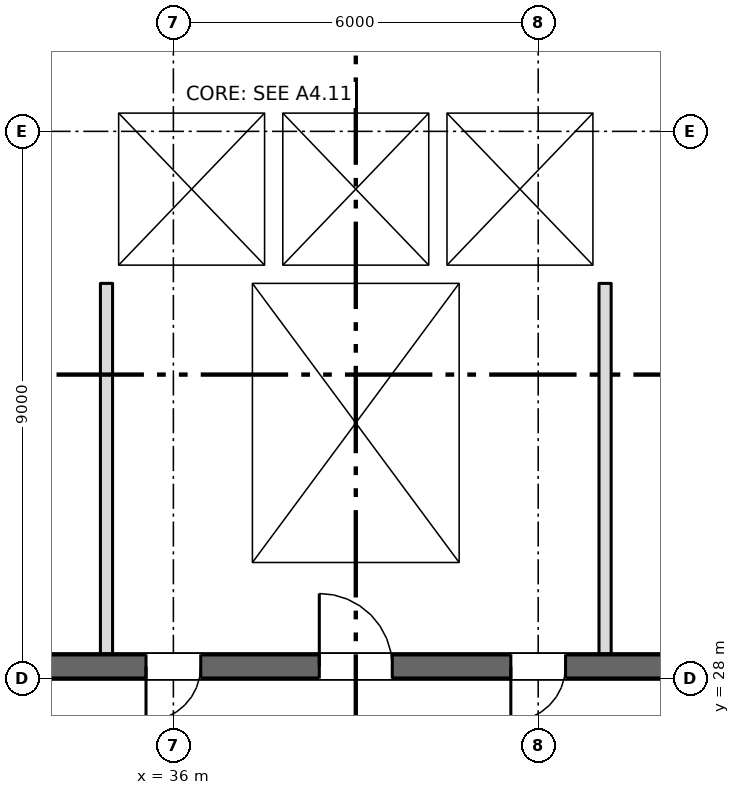
"""IFC4 building model, lengths in metres.
Left out: names, types, materials, properties, quantities, classifications, styles, units other than length and angle.
Written with IfcOpenShell. Run it as: python <this file> out.ifc"""

import sys

from ifc_helpers import new_model, si_unit, direction, frame, frame_2d, origin, place, context, subcontext, project, spatial, rectangle, extrude, element, fill, save


model = new_model("IFC4")
c1 = context("Model", 3, precision=1e-05, world=origin(), true_north=direction((0.0, 1.0)))
c2 = subcontext(c1, "Body", "Model", "MODEL_VIEW")
j1 = project(units=[si_unit("LENGTHUNIT", "METRE"), si_unit("PLANEANGLEUNIT", "RADIAN")], contexts=[c1])
p1 = place(None, origin())
s1 = spatial("IfcSite", under=j1, at=p1, CompositionType="ELEMENT")
p2 = place(p1, origin())
s2 = spatial("IfcBuilding", under=s1, at=p2, CompositionType="ELEMENT")
p3 = place(p2, frame((0.0, 0.0, 63.75)))
s3 = spatial("IfcBuildingStorey", under=s2, at=p3, CompositionType="ELEMENT", Elevation=63.75)
p4 = place(p3, frame((6.7, 28.2, 0.0), z_axis=(0.0, 0.0, 1.0), x_axis=(1.0, 0.0, 0.0)))
e1 = element("IfcWall", 1, at=p4, inside=s3, PredefinedType="SHEAR", context=c2, shape_type="SweptSolid", body=[
    extrude(rectangle(XDim=57.8, YDim=0.4, at=frame_2d((28.9, 0.0))), origin(), (0.0, 0.0, 1.0), 3.35),
])
p5 = place(p4, frame((12.562, 0.0, 0.0)))
e2 = element("IfcOpeningElement", 2, at=p5, cuts=e1, PredefinedType="OPENING", context=c2, shape_type="SweptSolid", body=[
    extrude(rectangle(XDim=0.9, YDim=2.1, at=frame_2d((0.45, 1.05))), frame((0.0, 0.21, 0.0), z_axis=(0.0, -1.0, 0.0), x_axis=(1.0, 0.0, 0.0)), (0.0, 0.0, 1.0), 0.42),
])
p6 = place(p4, frame((15.137, 0.0, 0.0)))
e3 = element("IfcOpeningElement", 3, at=p6, cuts=e1, PredefinedType="OPENING", context=c2, shape_type="SweptSolid", body=[
    extrude(rectangle(XDim=0.9, YDim=2.1, at=frame_2d((0.45, 1.05))), frame((0.0, 0.21, 0.0), z_axis=(0.0, -1.0, 0.0), x_axis=(1.0, 0.0, 0.0)), (0.0, 0.0, 1.0), 0.42),
])
p7 = place(p4, frame((49.85, 0.0, 0.0)))
e4 = element("IfcOpeningElement", 4, at=p7, cuts=e1, PredefinedType="OPENING", context=c2, shape_type="SweptSolid", body=[
    extrude(rectangle(XDim=0.9, YDim=2.1, at=frame_2d((0.45, 1.05))), frame((0.0, 0.21, 0.0), z_axis=(0.0, -1.0, 0.0), x_axis=(1.0, 0.0, 0.0)), (0.0, 0.0, 1.0), 0.42),
])
p8 = place(p4, frame((0.562, 0.0, 0.0)))
e5 = element("IfcOpeningElement", 5, at=p8, cuts=e1, PredefinedType="OPENING", context=c2, shape_type="SweptSolid", body=[
    extrude(rectangle(XDim=0.9, YDim=2.1, at=frame_2d((0.45, 1.05))), frame((0.0, 0.21, 0.0), z_axis=(0.0, -1.0, 0.0), x_axis=(1.0, 0.0, 0.0)), (0.0, 0.0, 1.0), 0.42),
])
p9 = place(p4, frame((2.137, 0.0, 0.0)))
e6 = element("IfcOpeningElement", 6, at=p9, cuts=e1, PredefinedType="OPENING", context=c2, shape_type="SweptSolid", body=[
    extrude(rectangle(XDim=0.9, YDim=2.1, at=frame_2d((0.45, 1.05))), frame((0.0, 0.21, 0.0), z_axis=(0.0, -1.0, 0.0), x_axis=(1.0, 0.0, 0.0)), (0.0, 0.0, 1.0), 0.42),
])
p10 = place(p4, frame((4.7, 0.0, 0.0)))
e7 = element("IfcOpeningElement", 7, at=p10, cuts=e1, PredefinedType="OPENING", context=c2, shape_type="SweptSolid", body=[
    extrude(rectangle(XDim=1.2, YDim=2.1, at=frame_2d((0.6, 1.05))), frame((0.0, 0.21, 0.0), z_axis=(0.0, -1.0, 0.0), x_axis=(1.0, 0.0, 0.0)), (0.0, 0.0, 1.0), 0.42),
])
p11 = place(p4, frame((31.7, 0.0, 0.0)))
e8 = element("IfcOpeningElement", 8, at=p11, cuts=e1, PredefinedType="OPENING", context=c2, shape_type="SweptSolid", body=[
    extrude(rectangle(XDim=1.2, YDim=2.1, at=frame_2d((0.6, 1.05))), frame((0.0, 0.21, 0.0), z_axis=(0.0, -1.0, 0.0), x_axis=(1.0, 0.0, 0.0)), (0.0, 0.0, 1.0), 0.42),
])
p12 = place(p4, frame((55.2, 0.0, 0.0)))
e9 = element("IfcOpeningElement", 9, at=p12, cuts=e1, PredefinedType="OPENING", context=c2, shape_type="SweptSolid", body=[
    extrude(rectangle(XDim=1.2, YDim=2.1, at=frame_2d((0.6, 1.05))), frame((0.0, 0.21, 0.0), z_axis=(0.0, -1.0, 0.0), x_axis=(1.0, 0.0, 0.0)), (0.0, 0.0, 1.0), 0.42),
])
p13 = place(p4, frame((21.7, 0.0, 0.0)))
e10 = element("IfcOpeningElement", 10, at=p13, cuts=e1, PredefinedType="OPENING", context=c2, shape_type="SweptSolid", body=[
    extrude(rectangle(XDim=1.2, YDim=2.1, at=frame_2d((0.6, 1.05))), frame((0.0, 0.21, 0.0), z_axis=(0.0, -1.0, 0.0), x_axis=(1.0, 0.0, 0.0)), (0.0, 0.0, 1.0), 0.42),
])
p14 = place(p4, frame((41.7, 0.0, 0.0)))
e11 = element("IfcOpeningElement", 11, at=p14, cuts=e1, PredefinedType="OPENING", context=c2, shape_type="SweptSolid", body=[
    extrude(rectangle(XDim=1.2, YDim=2.1, at=frame_2d((0.6, 1.05))), frame((0.0, 0.21, 0.0), z_axis=(0.0, -1.0, 0.0), x_axis=(1.0, 0.0, 0.0)), (0.0, 0.0, 1.0), 0.42),
])
p15 = place(p4, frame((24.85, 0.0, 0.0)))
e12 = element("IfcOpeningElement", 12, at=p15, cuts=e1, PredefinedType="OPENING", context=c2, shape_type="SweptSolid", body=[
    extrude(rectangle(XDim=2.4, YDim=2.1, at=frame_2d((1.2, 1.05))), frame((0.0, 0.21, 0.0), z_axis=(0.0, -1.0, 0.0), x_axis=(1.0, 0.0, 0.0)), (0.0, 0.0, 1.0), 0.42),
])
p16 = place(p4, frame((37.35, 0.0, 0.0)))
e13 = element("IfcOpeningElement", 13, at=p16, cuts=e1, PredefinedType="OPENING", context=c2, shape_type="SweptSolid", body=[
    extrude(rectangle(XDim=2.4, YDim=2.1, at=frame_2d((1.2, 1.05))), frame((0.0, 0.21, 0.0), z_axis=(0.0, -1.0, 0.0), x_axis=(1.0, 0.0, 0.0)), (0.0, 0.0, 1.0), 0.42),
])
p17 = place(p4, frame((7.85, 0.0, 0.0)))
e14 = element("IfcOpeningElement", 14, at=p17, cuts=e1, PredefinedType="OPENING", context=c2, shape_type="SweptSolid", body=[
    extrude(rectangle(XDim=2.4, YDim=2.1, at=frame_2d((1.2, 1.05))), frame((0.0, 0.21, 0.0), z_axis=(0.0, -1.0, 0.0), x_axis=(1.0, 0.0, 0.0)), (0.0, 0.0, 1.0), 0.42),
])
p18 = place(p4, frame((28.85, 0.0, 0.0)))
e15 = element("IfcOpeningElement", 15, at=p18, cuts=e1, PredefinedType="OPENING", context=c2, shape_type="SweptSolid", body=[
    extrude(rectangle(XDim=0.9, YDim=2.1, at=frame_2d((0.45, 1.05))), frame((0.0, 0.21, 0.0), z_axis=(0.0, -1.0, 0.0), x_axis=(1.0, 0.0, 0.0)), (0.0, 0.0, 1.0), 0.42),
])
p19 = place(p4, frame((34.85, 0.0, 0.0)))
e16 = element("IfcOpeningElement", 16, at=p19, cuts=e1, PredefinedType="OPENING", context=c2, shape_type="SweptSolid", body=[
    extrude(rectangle(XDim=0.9, YDim=2.1, at=frame_2d((0.45, 1.05))), frame((0.0, 0.21, 0.0), z_axis=(0.0, -1.0, 0.0), x_axis=(1.0, 0.0, 0.0)), (0.0, 0.0, 1.0), 0.42),
])
for number, where, z_axis, x_axis in (
    (17, (37.15, 28.4, 0.0), (0.0, 0.0, 1.0), (0.0, 1.0, 0.0)),
    (18, (40.85, 28.4, 0.0), (0.0, 0.0, 1.0), (0.0, 1.0, 0.0)),
):
    element("IfcWall", number, at=place(p3, frame(where, z_axis=z_axis, x_axis=x_axis)), inside=s3, PredefinedType="SHEAR", context=c2, shape_type="SweptSolid", body=[
        extrude(rectangle(XDim=6.1, YDim=0.3, at=frame_2d((3.05, 0.0))), origin(), (0.0, 0.0, 1.0), 3.35),
    ])
p20 = place(p3, frame((34.8, 34.65, 0.0), z_axis=(0.0, 0.0, 1.0), x_axis=(1.0, 0.0, 0.0)))
e19 = element("IfcWall", 19, at=p20, inside=s3, PredefinedType="SHEAR", context=c2, shape_type="SweptSolid", body=[
    extrude(rectangle(XDim=8.4, YDim=0.3, at=frame_2d((4.2, 0.0))), origin(), (0.0, 0.0, 1.0), 3.35),
])
p21 = place(p3, frame((34.8, 37.45, 0.0), z_axis=(0.0, 0.0, 1.0), x_axis=(1.0, 0.0, 0.0)))
e20 = element("IfcWall", 20, at=p21, inside=s3, PredefinedType="SHEAR", context=c2, shape_type="SweptSolid", body=[
    extrude(rectangle(XDim=8.4, YDim=0.3, at=frame_2d((4.2, 0.0))), origin(), (0.0, 0.0, 1.0), 3.35),
])
p22 = place(p21, frame((0.95, 0.0, 0.0)))
e21 = element("IfcOpeningElement", 21, at=p22, cuts=e20, PredefinedType="OPENING", context=c2, shape_type="SweptSolid", body=[
    extrude(rectangle(XDim=1.1, YDim=2.1, at=frame_2d((0.55, 1.05))), frame((0.0, 0.16, 0.0), z_axis=(0.0, -1.0, 0.0), x_axis=(1.0, 0.0, 0.0)), (0.0, 0.0, 1.0), 0.32),
])
p23 = place(p21, frame((3.65, 0.0, 0.0)))
e22 = element("IfcOpeningElement", 22, at=p23, cuts=e20, PredefinedType="OPENING", context=c2, shape_type="SweptSolid", body=[
    extrude(rectangle(XDim=1.1, YDim=2.1, at=frame_2d((0.55, 1.05))), frame((0.0, 0.16, 0.0), z_axis=(0.0, -1.0, 0.0), x_axis=(1.0, 0.0, 0.0)), (0.0, 0.0, 1.0), 0.32),
])
p24 = place(p21, frame((6.35, 0.0, 0.0)))
e23 = element("IfcOpeningElement", 23, at=p24, cuts=e20, PredefinedType="OPENING", context=c2, shape_type="SweptSolid", body=[
    extrude(rectangle(XDim=1.1, YDim=2.1, at=frame_2d((0.55, 1.05))), frame((0.0, 0.16, 0.0), z_axis=(0.0, -1.0, 0.0), x_axis=(1.0, 0.0, 0.0)), (0.0, 0.0, 1.0), 0.32),
])
for number, where, z_axis, x_axis in (
    (24, (34.95, 34.8, 0.0), (0.0, 0.0, 1.0), (0.0, 1.0, 0.0)),
    (25, (43.05, 34.8, 0.0), (0.0, 0.0, 1.0), (0.0, 1.0, 0.0)),
    (26, (37.65, 34.8, 0.0), (0.0, 0.0, 1.0), (0.0, 1.0, 0.0)),
    (27, (40.35, 34.8, 0.0), (0.0, 0.0, 1.0), (0.0, 1.0, 0.0)),
):
    element("IfcWall", number, at=place(p3, frame(where, z_axis=z_axis, x_axis=x_axis)), inside=s3, PredefinedType="SHEAR", context=c2, shape_type="SweptSolid", body=[
        extrude(rectangle(XDim=2.5, YDim=0.3, at=frame_2d((1.25, 0.0))), origin(), (0.0, 0.0, 1.0), 3.35),
    ])
for number, where, z_axis, x_axis in (
    (28, (34.9, 28.4, 0.0), (0.0, 0.0, 1.0), (0.0, 1.0, 0.0)),
    (29, (43.1, 28.4, 0.0), (0.0, 0.0, 1.0), (0.0, 1.0, 0.0)),
):
    element("IfcWall", number, at=place(p3, frame(where, z_axis=z_axis, x_axis=x_axis)), inside=s3, PredefinedType="PARTITIONING", context=c2, shape_type="SweptSolid", body=[
        extrude(rectangle(XDim=6.1, YDim=0.2, at=frame_2d((3.05, 0.0))), origin(), (0.0, 0.0, 1.0), 3.35),
    ])
p25 = place(p22, origin())
e30 = element("IfcDoor", 30, at=p25, inside=s3, OperationType="SLIDING_TO_LEFT", PredefinedType="DOOR", context=c2, shape_type="SweptSolid", body=[
    extrude(rectangle(XDim=1.1, YDim=2.1, at=frame_2d((0.55, 1.05))), frame((0.0, 0.025, 0.0), z_axis=(0.0, -1.0, 0.0), x_axis=(1.0, 0.0, 0.0)), (0.0, 0.0, 1.0), 0.05),
])
fill(e21, e30)
p26 = place(p23, origin())
e31 = element("IfcDoor", 31, at=p26, inside=s3, OperationType="SLIDING_TO_LEFT", PredefinedType="DOOR", context=c2, shape_type="SweptSolid", body=[
    extrude(rectangle(XDim=1.1, YDim=2.1, at=frame_2d((0.55, 1.05))), frame((0.0, 0.025, 0.0), z_axis=(0.0, -1.0, 0.0), x_axis=(1.0, 0.0, 0.0)), (0.0, 0.0, 1.0), 0.05),
])
fill(e22, e31)
p27 = place(p24, origin())
e32 = element("IfcDoor", 32, at=p27, inside=s3, OperationType="SLIDING_TO_LEFT", PredefinedType="DOOR", context=c2, shape_type="SweptSolid", body=[
    extrude(rectangle(XDim=1.1, YDim=2.1, at=frame_2d((0.55, 1.05))), frame((0.0, 0.025, 0.0), z_axis=(0.0, -1.0, 0.0), x_axis=(1.0, 0.0, 0.0)), (0.0, 0.0, 1.0), 0.05),
])
fill(e23, e32)
p28 = place(p11, origin())
e33 = element("IfcDoor", 33, at=p28, inside=s3, OperationType="SINGLE_SWING_LEFT", PredefinedType="DOOR", context=c2, shape_type="SweptSolid", body=[
    extrude(rectangle(XDim=1.2, YDim=2.1, at=frame_2d((0.6, 1.05))), frame((0.0, 0.025, 0.0), z_axis=(0.0, -1.0, 0.0), x_axis=(1.0, 0.0, 0.0)), (0.0, 0.0, 1.0), 0.05),
])
fill(e8, e33)
p29 = place(p18, origin())
e34 = element("IfcDoor", 34, at=p29, inside=s3, OperationType="SINGLE_SWING_LEFT", PredefinedType="DOOR", context=c2, shape_type="SweptSolid", body=[
    extrude(rectangle(XDim=0.9, YDim=2.1, at=frame_2d((0.45, 1.05))), frame((0.0, 0.025, 0.0), z_axis=(0.0, -1.0, 0.0), x_axis=(1.0, 0.0, 0.0)), (0.0, 0.0, 1.0), 0.05),
])
fill(e15, e34)
p30 = place(p19, origin())
e35 = element("IfcDoor", 35, at=p30, inside=s3, OperationType="SINGLE_SWING_LEFT", PredefinedType="DOOR", context=c2, shape_type="SweptSolid", body=[
    extrude(rectangle(XDim=0.9, YDim=2.1, at=frame_2d((0.45, 1.05))), frame((0.0, 0.025, 0.0), z_axis=(0.0, -1.0, 0.0), x_axis=(1.0, 0.0, 0.0)), (0.0, 0.0, 1.0), 0.05),
])
fill(e16, e35)
save(model, sys.argv[1])
